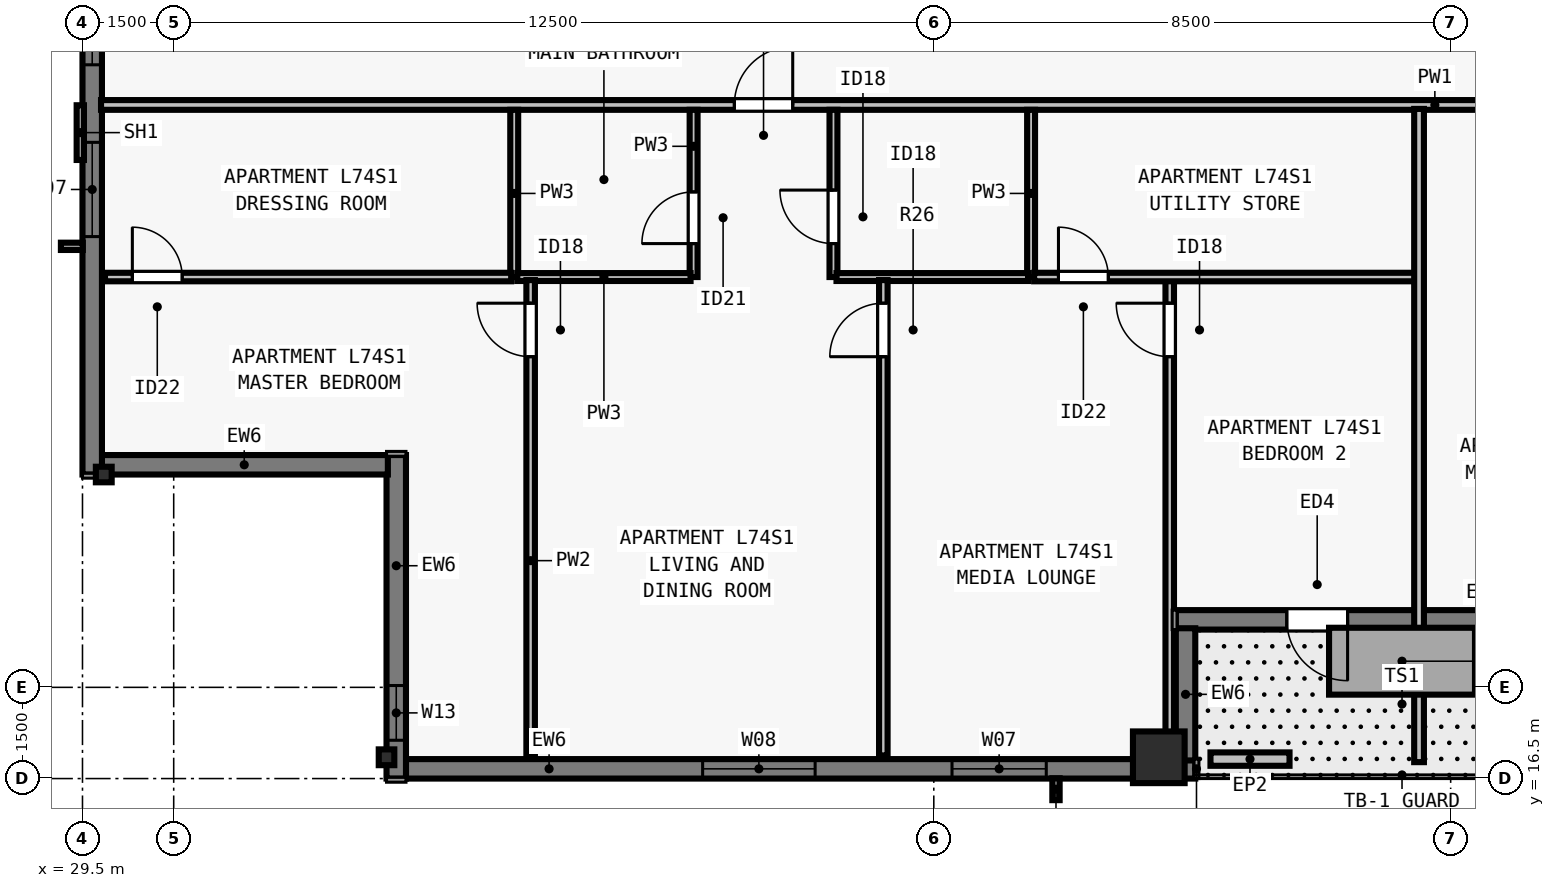
"""IFC4 building model, lengths in metres.
Left out: names, types, materials, properties, quantities, classifications, styles, units other than length and angle.
Written with IfcOpenShell. Run it as: python <this file> out.ifc"""

import sys

from ifc_helpers import new_model, si_unit, direction, frame, frame_2d, origin, origin_2d, place, context, subcontext, project, spatial, rectangle, i_section, extrude, element, fill, save


model = new_model("IFC4")
c1 = context("Model", 3, precision=1e-05, world=origin(), true_north=direction((0.0, 1.0)))
c2 = subcontext(c1, "Body", "Model", "MODEL_VIEW")
j1 = project(units=[si_unit("LENGTHUNIT", "METRE"), si_unit("PLANEANGLEUNIT", "RADIAN")], contexts=[c1])
p1 = place(None, origin())
s1 = spatial("IfcSite", under=j1, at=p1, CompositionType="ELEMENT")
p2 = place(p1, origin())
s2 = spatial("IfcBuilding", under=s1, at=p2, CompositionType="ELEMENT")
p3 = place(p2, frame((0.0, 0.0, 269.0)))
s3 = spatial("IfcBuildingStorey", under=s2, at=p3, CompositionType="ELEMENT", Elevation=269.0)
p4 = place(p3, frame((34.5, 16.85, 0.0), z_axis=(0.0, 0.0, 1.0), x_axis=(1.0, 0.0, 0.0)))
e1 = element("IfcColumn", 1, at=p4, inside=s3, PredefinedType="COLUMN", context=c2, shape_type="SweptSolid", body=[
    extrude(i_section(OverallWidth=0.256, OverallDepth=0.26, WebThickness=0.01, FlangeThickness=0.017, FilletRadius=0.013, at=origin_2d()), origin(), (0.0, 0.0, 1.0), 3.5),
])
p5 = place(p3, frame((47.2, 16.85, 0.0), z_axis=(0.0, 0.0, 1.0), x_axis=(1.0, 0.0, 0.0)))
e2 = element("IfcColumn", 2, at=p5, inside=s3, PredefinedType="COLUMN", context=c2, shape_type="SweptSolid", body=[
    extrude(rectangle(XDim=0.85, YDim=0.85, at=origin_2d()), origin(), (0.0, 0.0, 1.0), 3.5),
])
p6 = place(p3, frame((29.85, 21.5, 0.0), z_axis=(0.0, 0.0, 1.0), x_axis=(0.0, 1.0, 0.0)))
e3 = element("IfcColumn", 3, at=p6, inside=s3, PredefinedType="COLUMN", context=c2, shape_type="SweptSolid", body=[
    extrude(i_section(OverallWidth=0.256, OverallDepth=0.26, WebThickness=0.01, FlangeThickness=0.017, FilletRadius=0.013, at=origin_2d()), origin(), (0.0, 0.0, 1.0), 3.5),
])
p7 = place(p3, frame((47.8, 16.66, 0.0), z_axis=(0.0, 0.0, 1.0), x_axis=(-1.0, 0.0, 0.0)))
e4 = element("IfcWall", 4, at=p7, inside=s3, PredefinedType="SOLIDWALL", context=c2, shape_type="SweptSolid", body=[
    extrude(rectangle(XDim=13.002, YDim=0.32, at=frame_2d((6.501, 0.0))), origin(), (0.0, 0.0, 1.0), 3.29),
])
p8 = place(p7, frame((2.45, 0.0, 0.8)))
e5 = element("IfcOpeningElement", 5, at=p8, cuts=e4, PredefinedType="OPENING", context=c2, shape_type="SweptSolid", body=[
    extrude(rectangle(XDim=1.55, YDim=1.678, at=frame_2d((0.775, 0.839))), frame((0.0, 0.17, 0.0), z_axis=(0.0, -1.0, 0.0), x_axis=(1.0, 0.0, 0.0)), (0.0, 0.0, 1.0), 0.34),
])
p9 = place(p7, frame((6.251, 0.0, 0.8)))
e6 = element("IfcOpeningElement", 6, at=p9, cuts=e4, PredefinedType="OPENING", context=c2, shape_type="SweptSolid", body=[
    extrude(rectangle(XDim=1.85, YDim=1.678, at=frame_2d((0.925, 0.839))), frame((0.0, 0.17, 0.0), z_axis=(0.0, -1.0, 0.0), x_axis=(1.0, 0.0, 0.0)), (0.0, 0.0, 1.0), 0.34),
])
p10 = place(p3, frame((34.66, 16.5, 0.0), z_axis=(0.0, 0.0, 1.0), x_axis=(0.0, 1.0, 0.0)))
e7 = element("IfcWall", 7, at=p10, inside=s3, PredefinedType="SOLIDWALL", context=c2, shape_type="SweptSolid", body=[
    extrude(rectangle(XDim=5.32, YDim=0.32, at=frame_2d((2.66, 0.0))), origin(), (0.0, 0.0, 1.0), 3.29),
])
p11 = place(p10, frame((0.63, 0.0, 0.8)))
e8 = element("IfcOpeningElement", 8, at=p11, cuts=e7, PredefinedType="OPENING", context=c2, shape_type="SweptSolid", body=[
    extrude(rectangle(XDim=0.9, YDim=1.678, at=frame_2d((0.45, 0.839))), frame((0.0, 0.17, 0.0), z_axis=(0.0, -1.0, 0.0), x_axis=(1.0, 0.0, 0.0)), (0.0, 0.0, 1.0), 0.34),
])
p12 = place(p3, frame((34.522, 21.66, 0.0), z_axis=(0.0, 0.0, 1.0), x_axis=(-1.0, 0.0, 0.0)))
e9 = element("IfcWall", 9, at=p12, inside=s3, PredefinedType="SOLIDWALL", context=c2, shape_type="SweptSolid", body=[
    extrude(rectangle(XDim=4.724, YDim=0.32, at=frame_2d((2.362, 0.0))), origin(), (0.0, 0.0, 1.0), 3.29),
])
p13 = place(p3, frame((29.66, 21.5, 0.0), z_axis=(0.0, 0.0, 1.0), x_axis=(0.0, 1.0, 0.0)))
e10 = element("IfcWall", 10, at=p13, inside=s3, PredefinedType="SOLIDWALL", context=c2, shape_type="SweptSolid", body=[
    extrude(rectangle(XDim=34.702, YDim=0.32, at=frame_2d((17.351, 0.0))), origin(), (0.0, 0.0, 1.0), 3.29),
])
p14 = place(p13, frame((3.913, 0.0, 0.8)))
e11 = element("IfcOpeningElement", 11, at=p14, cuts=e10, PredefinedType="OPENING", context=c2, shape_type="SweptSolid", body=[
    extrude(rectangle(XDim=1.55, YDim=1.678, at=frame_2d((0.775, 0.839))), frame((0.0, 0.17, 0.0), z_axis=(0.0, -1.0, 0.0), x_axis=(1.0, 0.0, 0.0)), (0.0, 0.0, 1.0), 0.34),
])
p15 = place(p13, frame((6.738, 0.0, 0.8)))
e12 = element("IfcOpeningElement", 12, at=p15, cuts=e10, PredefinedType="OPENING", context=c2, shape_type="SweptSolid", body=[
    extrude(rectangle(XDim=1.85, YDim=1.678, at=frame_2d((0.925, 0.839))), frame((0.0, 0.17, 0.0), z_axis=(0.0, -1.0, 0.0), x_axis=(1.0, 0.0, 0.0)), (0.0, 0.0, 1.0), 0.34),
])
p16 = place(p13, frame((10.263, 0.0, 0.8)))
e13 = element("IfcOpeningElement", 13, at=p16, cuts=e10, PredefinedType="OPENING", context=c2, shape_type="SweptSolid", body=[
    extrude(rectangle(XDim=1.55, YDim=1.678, at=frame_2d((0.775, 0.839))), frame((0.0, 0.17, 0.0), z_axis=(0.0, -1.0, 0.0), x_axis=(1.0, 0.0, 0.0)), (0.0, 0.0, 1.0), 0.34),
])
p17 = place(p13, frame((14.738, 0.0, 0.8)))
e14 = element("IfcOpeningElement", 14, at=p17, cuts=e10, PredefinedType="OPENING", context=c2, shape_type="SweptSolid", body=[
    extrude(rectangle(XDim=1.85, YDim=1.678, at=frame_2d((0.925, 0.839))), frame((0.0, 0.17, 0.0), z_axis=(0.0, -1.0, 0.0), x_axis=(1.0, 0.0, 0.0)), (0.0, 0.0, 1.0), 0.34),
])
p18 = place(p13, frame((18.264, 0.0, 0.8)))
e15 = element("IfcOpeningElement", 15, at=p18, cuts=e10, PredefinedType="OPENING", context=c2, shape_type="SweptSolid", body=[
    extrude(rectangle(XDim=1.55, YDim=1.678, at=frame_2d((0.775, 0.839))), frame((0.0, 0.17, 0.0), z_axis=(0.0, -1.0, 0.0), x_axis=(1.0, 0.0, 0.0)), (0.0, 0.0, 1.0), 0.34),
])
p19 = place(p13, frame((24.164, 0.0, 0.8)))
e16 = element("IfcOpeningElement", 16, at=p19, cuts=e10, PredefinedType="OPENING", context=c2, shape_type="SweptSolid", body=[
    extrude(rectangle(XDim=1.55, YDim=1.678, at=frame_2d((0.775, 0.839))), frame((0.0, 0.17, 0.0), z_axis=(0.0, -1.0, 0.0), x_axis=(1.0, 0.0, 0.0)), (0.0, 0.0, 1.0), 0.34),
])
p20 = place(p3, frame((54.622, 19.11, 0.0), z_axis=(0.0, 0.0, 1.0), x_axis=(-1.0, 0.0, 0.0)))
e17 = element("IfcWall", 17, at=p20, inside=s3, PredefinedType="SOLIDWALL", context=c2, shape_type="SweptSolid", body=[
    extrude(rectangle(XDim=7.142, YDim=0.32, at=frame_2d((3.571, 0.0))), origin(), (0.0, 0.0, 1.0), 3.29),
])
p21 = place(p20, frame((4.317, 0.0, 0.0)))
e18 = element("IfcOpeningElement", 18, at=p21, cuts=e17, PredefinedType="OPENING", context=c2, shape_type="SweptSolid", body=[
    extrude(rectangle(XDim=1.0, YDim=2.15, at=frame_2d((0.5, 1.075))), frame((0.0, 0.17, 0.0), z_axis=(0.0, -1.0, 0.0), x_axis=(1.0, 0.0, 0.0)), (0.0, 0.0, 1.0), 0.34),
])
p22 = place(p3, frame((47.64, 18.972, 0.0), z_axis=(0.0, 0.0, 1.0), x_axis=(0.0, -1.0, 0.0)))
e19 = element("IfcWall", 19, at=p22, inside=s3, PredefinedType="SOLIDWALL", context=c2, shape_type="SweptSolid", body=[
    extrude(rectangle(XDim=2.174, YDim=0.32, at=frame_2d((1.087, 0.0))), origin(), (0.0, 0.0, 1.0), 3.29),
])
p23 = place(p3, frame((48.05, 16.82, 0.0), z_axis=(0.0, 0.0, 1.0), x_axis=(1.0, 0.0, 0.0)))
e20 = element("IfcWall", 20, at=p23, inside=s3, PredefinedType="PARAPET", context=c2, shape_type="SweptSolid", body=[
    extrude(rectangle(XDim=1.3, YDim=0.22, at=frame_2d((0.65, 0.0))), origin(), (0.0, 0.0, 1.0), 0.55),
])
p24 = place(p3, frame((29.805, 27.577, 0.0), z_axis=(0.0, 0.0, 1.0), x_axis=(1.0, 0.0, 0.0)))
e21 = element("IfcWall", 21, at=p24, inside=s3, PredefinedType="PARTITIONING", context=c2, shape_type="SweptSolid", body=[
    extrude(rectangle(XDim=44.39, YDim=0.16, at=frame_2d((22.195, 0.0))), origin(), (0.0, 0.0, 1.0), 2.958),
])
p25 = place(p24, frame((10.415, 0.0, 0.0)))
e22 = element("IfcOpeningElement", 22, at=p25, cuts=e21, PredefinedType="OPENING", context=c2, shape_type="SweptSolid", body=[
    extrude(rectangle(XDim=0.96, YDim=2.18, at=frame_2d((0.48, 1.09))), frame((0.0, 0.09, 0.0), z_axis=(0.0, -1.0, 0.0), x_axis=(1.0, 0.0, 0.0)), (0.0, 0.0, 1.0), 0.18),
])
p26 = place(p24, frame((32.495, 0.0, 0.0)))
e23 = element("IfcOpeningElement", 23, at=p26, cuts=e21, PredefinedType="OPENING", context=c2, shape_type="SweptSolid", body=[
    extrude(rectangle(XDim=0.96, YDim=2.18, at=frame_2d((0.48, 1.09))), frame((0.0, 0.09, 0.0), z_axis=(0.0, -1.0, 0.0), x_axis=(1.0, 0.0, 0.0)), (0.0, 0.0, 1.0), 0.18),
])
p27 = place(p3, frame((36.6, 24.748, 0.0), z_axis=(0.0, 0.0, 1.0), x_axis=(0.0, 1.0, 0.0)))
e24 = element("IfcWall", 24, at=p27, inside=s3, PredefinedType="PLUMBINGWALL", context=c2, shape_type="SweptSolid", body=[
    extrude(rectangle(XDim=2.75, YDim=0.13, at=frame_2d((1.375, 0.0))), origin(), (0.0, 0.0, 1.0), 3.29),
])
p28 = place(p3, frame((39.55, 24.748, 0.0), z_axis=(0.0, 0.0, 1.0), x_axis=(0.0, 1.0, 0.0)))
e25 = element("IfcWall", 25, at=p28, inside=s3, PredefinedType="PLUMBINGWALL", context=c2, shape_type="SweptSolid", body=[
    extrude(rectangle(XDim=2.75, YDim=0.13, at=frame_2d((1.375, 0.0))), origin(), (0.0, 0.0, 1.0), 3.29),
])
p29 = place(p28, frame((0.55, 0.0, 0.0)))
e26 = element("IfcOpeningElement", 26, at=p29, cuts=e25, PredefinedType="OPENING", context=c2, shape_type="SweptSolid", body=[
    extrude(rectangle(XDim=0.85, YDim=2.08, at=frame_2d((0.425, 1.04))), frame((0.0, 0.075, 0.0), z_axis=(0.0, -1.0, 0.0), x_axis=(1.0, 0.0, 0.0)), (0.0, 0.0, 1.0), 0.15),
])
p30 = place(p3, frame((36.65, 24.748, 0.0), z_axis=(0.0, 0.0, 1.0), x_axis=(1.0, 0.0, 0.0)))
e27 = element("IfcWall", 27, at=p30, inside=s3, PredefinedType="PLUMBINGWALL", context=c2, shape_type="SweptSolid", body=[
    extrude(rectangle(XDim=2.85, YDim=0.13, at=frame_2d((1.425, 0.0))), origin(), (0.0, 0.0, 1.0), 3.29),
])
p31 = place(p3, frame((45.1, 24.748, 0.0), z_axis=(0.0, 0.0, 1.0), x_axis=(0.0, 1.0, 0.0)))
e28 = element("IfcWall", 28, at=p31, inside=s3, PredefinedType="PLUMBINGWALL", context=c2, shape_type="SweptSolid", body=[
    extrude(rectangle(XDim=2.75, YDim=0.13, at=frame_2d((1.375, 0.0))), origin(), (0.0, 0.0, 1.0), 3.29),
])
p32 = place(p3, frame((41.85, 24.748, 0.0), z_axis=(0.0, 0.0, 1.0), x_axis=(0.0, 1.0, 0.0)))
e29 = element("IfcWall", 29, at=p32, inside=s3, PredefinedType="PLUMBINGWALL", context=c2, shape_type="SweptSolid", body=[
    extrude(rectangle(XDim=2.75, YDim=0.13, at=frame_2d((1.375, 0.0))), origin(), (0.0, 0.0, 1.0), 3.29),
])
p33 = place(p32, frame((0.55, 0.0, 0.0)))
e30 = element("IfcOpeningElement", 30, at=p33, cuts=e29, PredefinedType="OPENING", context=c2, shape_type="SweptSolid", body=[
    extrude(rectangle(XDim=0.88, YDim=2.1, at=frame_2d((0.44, 1.05))), frame((0.0, 0.075, 0.0), z_axis=(0.0, -1.0, 0.0), x_axis=(1.0, 0.0, 0.0)), (0.0, 0.0, 1.0), 0.15),
])
p34 = place(p3, frame((41.9, 24.748, 0.0), z_axis=(0.0, 0.0, 1.0), x_axis=(1.0, 0.0, 0.0)))
e31 = element("IfcWall", 31, at=p34, inside=s3, PredefinedType="PLUMBINGWALL", context=c2, shape_type="SweptSolid", body=[
    extrude(rectangle(XDim=3.15, YDim=0.13, at=frame_2d((1.575, 0.0))), origin(), (0.0, 0.0, 1.0), 3.29),
])
p35 = place(p3, frame((36.87, 16.88, 0.0), z_axis=(0.0, 0.0, 1.0), x_axis=(0.0, 1.0, 0.0)))
e32 = element("IfcWall", 32, at=p35, inside=s3, PredefinedType="PARTITIONING", context=c2, shape_type="SweptSolid", body=[
    extrude(rectangle(XDim=7.818, YDim=0.14, at=frame_2d((3.909, 0.0))), origin(), (0.0, 0.0, 1.0), 2.573),
])
p36 = place(p35, frame((6.558, 0.0, 0.0)))
e33 = element("IfcOpeningElement", 33, at=p36, cuts=e32, PredefinedType="OPENING", context=c2, shape_type="SweptSolid", body=[
    extrude(rectangle(XDim=0.88, YDim=2.1, at=frame_2d((0.44, 1.05))), frame((0.0, 0.08, 0.0), z_axis=(0.0, -1.0, 0.0), x_axis=(1.0, 0.0, 0.0)), (0.0, 0.0, 1.0), 0.16),
])
p37 = place(p3, frame((29.87, 24.748, 0.0), z_axis=(0.0, 0.0, 1.0), x_axis=(1.0, 0.0, 0.0)))
e34 = element("IfcWall", 34, at=p37, inside=s3, PredefinedType="PARTITIONING", context=c2, shape_type="SweptSolid", body=[
    extrude(rectangle(XDim=6.68, YDim=0.14, at=frame_2d((3.34, 0.0))), origin(), (0.0, 0.0, 1.0), 2.958),
])
p38 = place(p37, frame((0.45, 0.0, 0.0)))
e35 = element("IfcOpeningElement", 35, at=p38, cuts=e34, PredefinedType="OPENING", context=c2, shape_type="SweptSolid", body=[
    extrude(rectangle(XDim=0.82, YDim=2.1, at=frame_2d((0.41, 1.05))), frame((0.0, 0.08, 0.0), z_axis=(0.0, -1.0, 0.0), x_axis=(1.0, 0.0, 0.0)), (0.0, 0.0, 1.0), 0.16),
])
p39 = place(p3, frame((47.38, 16.88, 0.0), z_axis=(0.0, 0.0, 1.0), x_axis=(0.0, 1.0, 0.0)))
e36 = element("IfcWall", 36, at=p39, inside=s3, PredefinedType="PARTITIONING", context=c2, shape_type="SweptSolid", body=[
    extrude(rectangle(XDim=7.908, YDim=0.14, at=frame_2d((3.954, 0.0))), origin(), (0.0, 0.0, 1.0), 2.573),
])
p40 = place(p39, frame((6.558, 0.0, 0.0)))
e37 = element("IfcOpeningElement", 37, at=p40, cuts=e36, PredefinedType="OPENING", context=c2, shape_type="SweptSolid", body=[
    extrude(rectangle(XDim=0.88, YDim=2.1, at=frame_2d((0.44, 1.05))), frame((0.0, 0.08, 0.0), z_axis=(0.0, -1.0, 0.0), x_axis=(1.0, 0.0, 0.0)), (0.0, 0.0, 1.0), 0.16),
])
p41 = place(p3, frame((45.15, 24.748, 0.0), z_axis=(0.0, 0.0, 1.0), x_axis=(1.0, 0.0, 0.0)))
e38 = element("IfcWall", 38, at=p41, inside=s3, PredefinedType="PARTITIONING", context=c2, shape_type="SweptSolid", body=[
    extrude(rectangle(XDim=6.38, YDim=0.14, at=frame_2d((3.19, 0.0))), origin(), (0.0, 0.0, 1.0), 3.29),
])
p42 = place(p41, frame((0.4, 0.0, 0.0)))
e39 = element("IfcOpeningElement", 39, at=p42, cuts=e38, PredefinedType="OPENING", context=c2, shape_type="SweptSolid", body=[
    extrude(rectangle(XDim=0.82, YDim=2.1, at=frame_2d((0.41, 1.05))), frame((0.0, 0.08, 0.0), z_axis=(0.0, -1.0, 0.0), x_axis=(1.0, 0.0, 0.0)), (0.0, 0.0, 1.0), 0.16),
])
p43 = place(p3, frame((42.67, 16.88, 0.0), z_axis=(0.0, 0.0, 1.0), x_axis=(0.0, 1.0, 0.0)))
e40 = element("IfcWall", 40, at=p43, inside=s3, PredefinedType="PARTITIONING", context=c2, shape_type="SweptSolid", body=[
    extrude(rectangle(XDim=7.818, YDim=0.14, at=frame_2d((3.909, 0.0))), origin(), (0.0, 0.0, 1.0), 3.29),
])
p44 = place(p43, frame((6.558, 0.0, 0.0)))
e41 = element("IfcOpeningElement", 41, at=p44, cuts=e40, PredefinedType="OPENING", context=c2, shape_type="SweptSolid", body=[
    extrude(rectangle(XDim=0.88, YDim=2.1, at=frame_2d((0.44, 1.05))), frame((0.0, 0.08, 0.0), z_axis=(0.0, -1.0, 0.0), x_axis=(1.0, 0.0, 0.0)), (0.0, 0.0, 1.0), 0.16),
])
p45 = place(p3, frame((51.48, 16.77, 0.0), z_axis=(0.0, 0.0, 1.0), x_axis=(0.0, 1.0, 0.0)))
e42 = element("IfcWall", 42, at=p45, inside=s3, PredefinedType="PARTITIONING", context=c2, shape_type="SweptSolid", body=[
    extrude(rectangle(XDim=10.742, YDim=0.16, at=frame_2d((5.371, 0.0))), origin(), (0.0, 0.0, 1.0), 2.958),
])
p46 = place(p8, origin())
e43 = element("IfcWindow", 43, at=p46, inside=s3, PartitioningType="SINGLE_PANEL", PredefinedType="WINDOW", context=c2, shape_type="SweptSolid", body=[
    extrude(rectangle(XDim=1.55, YDim=1.678, at=frame_2d((0.775, 0.839))), frame((0.0, -0.05, 0.0), z_axis=(0.0, -1.0, 0.0), x_axis=(1.0, 0.0, 0.0)), (0.0, 0.0, 1.0), 0.06),
])
fill(e5, e43)
p47 = place(p9, origin())
e44 = element("IfcWindow", 44, at=p47, inside=s3, PartitioningType="SINGLE_PANEL", PredefinedType="WINDOW", context=c2, shape_type="SweptSolid", body=[
    extrude(rectangle(XDim=1.85, YDim=1.678, at=frame_2d((0.925, 0.839))), frame((0.0, -0.05, 0.0), z_axis=(0.0, -1.0, 0.0), x_axis=(1.0, 0.0, 0.0)), (0.0, 0.0, 1.0), 0.06),
])
fill(e6, e44)
p48 = place(p14, origin())
e45 = element("IfcWindow", 45, at=p48, inside=s3, PartitioningType="SINGLE_PANEL", PredefinedType="WINDOW", context=c2, shape_type="SweptSolid", body=[
    extrude(rectangle(XDim=1.55, YDim=1.678, at=frame_2d((0.775, 0.839))), frame((0.0, -0.05, 0.0), z_axis=(0.0, -1.0, 0.0), x_axis=(1.0, 0.0, 0.0)), (0.0, 0.0, 1.0), 0.06),
])
fill(e11, e45)
p49 = place(p15, origin())
e46 = element("IfcWindow", 46, at=p49, inside=s3, PartitioningType="SINGLE_PANEL", PredefinedType="WINDOW", context=c2, shape_type="SweptSolid", body=[
    extrude(rectangle(XDim=1.85, YDim=1.678, at=frame_2d((0.925, 0.839))), frame((0.0, -0.05, 0.0), z_axis=(0.0, -1.0, 0.0), x_axis=(1.0, 0.0, 0.0)), (0.0, 0.0, 1.0), 0.06),
])
fill(e12, e46)
p50 = place(p21, origin())
e47 = element("IfcDoor", 47, at=p50, inside=s3, OperationType="SINGLE_SWING_LEFT", PredefinedType="DOOR", context=c2, shape_type="SweptSolid", body=[
    extrude(rectangle(XDim=1.0, YDim=2.15, at=frame_2d((0.5, 1.075))), frame((0.0, 0.025, 0.0), z_axis=(0.0, -1.0, 0.0), x_axis=(1.0, 0.0, 0.0)), (0.0, 0.0, 1.0), 0.05),
])
fill(e18, e47)
p51 = place(p11, origin())
e48 = element("IfcWindow", 48, at=p51, inside=s3, PartitioningType="SINGLE_PANEL", PredefinedType="WINDOW", context=c2, shape_type="SweptSolid", body=[
    extrude(rectangle(XDim=0.9, YDim=1.678, at=frame_2d((0.45, 0.839))), frame((0.0, -0.04, 0.0), z_axis=(0.0, -1.0, 0.0), x_axis=(1.0, 0.0, 0.0)), (0.0, 0.0, 1.0), 0.06),
])
fill(e8, e48)
p52 = place(p29, origin())
e49 = element("IfcDoor", 49, at=p52, inside=s3, OperationType="SINGLE_SWING_LEFT", PredefinedType="DOOR", context=c2, shape_type="SweptSolid", body=[
    extrude(rectangle(XDim=0.85, YDim=2.08, at=frame_2d((0.425, 1.04))), frame((0.0, 0.025, 0.0), z_axis=(0.0, -1.0, 0.0), x_axis=(1.0, 0.0, 0.0)), (0.0, 0.0, 1.0), 0.05),
])
fill(e26, e49)
p53 = place(p33, origin())
e50 = element("IfcDoor", 50, at=p53, inside=s3, OperationType="SINGLE_SWING_RIGHT", PredefinedType="DOOR", context=c2, shape_type="SweptSolid", body=[
    extrude(rectangle(XDim=0.88, YDim=2.1, at=frame_2d((0.44, 1.05))), frame((0.0, 0.025, 0.0), z_axis=(0.0, -1.0, 0.0), x_axis=(1.0, 0.0, 0.0)), (0.0, 0.0, 1.0), 0.05),
])
fill(e30, e50)
p54 = place(p38, origin())
e51 = element("IfcDoor", 51, at=p54, inside=s3, OperationType="SINGLE_SWING_LEFT", PredefinedType="DOOR", context=c2, shape_type="SweptSolid", body=[
    extrude(rectangle(XDim=0.82, YDim=2.1, at=frame_2d((0.41, 1.05))), frame((0.0, 0.025, 0.0), z_axis=(0.0, -1.0, 0.0), x_axis=(1.0, 0.0, 0.0)), (0.0, 0.0, 1.0), 0.05),
])
fill(e35, e51)
p55 = place(p36, origin())
e52 = element("IfcDoor", 52, at=p55, inside=s3, OperationType="SINGLE_SWING_RIGHT", PredefinedType="DOOR", context=c2, shape_type="SweptSolid", body=[
    extrude(rectangle(XDim=0.88, YDim=2.1, at=frame_2d((0.44, 1.05))), frame((0.0, 0.025, 0.0), z_axis=(0.0, -1.0, 0.0), x_axis=(1.0, 0.0, 0.0)), (0.0, 0.0, 1.0), 0.05),
])
fill(e33, e52)
p56 = place(p42, origin())
e53 = element("IfcDoor", 53, at=p56, inside=s3, OperationType="SINGLE_SWING_LEFT", PredefinedType="DOOR", context=c2, shape_type="SweptSolid", body=[
    extrude(rectangle(XDim=0.82, YDim=2.1, at=frame_2d((0.41, 1.05))), frame((0.0, 0.025, 0.0), z_axis=(0.0, -1.0, 0.0), x_axis=(1.0, 0.0, 0.0)), (0.0, 0.0, 1.0), 0.05),
])
fill(e39, e53)
p57 = place(p40, origin())
e54 = element("IfcDoor", 54, at=p57, inside=s3, OperationType="SINGLE_SWING_RIGHT", PredefinedType="DOOR", context=c2, shape_type="SweptSolid", body=[
    extrude(rectangle(XDim=0.88, YDim=2.1, at=frame_2d((0.44, 1.05))), frame((0.0, 0.025, 0.0), z_axis=(0.0, -1.0, 0.0), x_axis=(1.0, 0.0, 0.0)), (0.0, 0.0, 1.0), 0.05),
])
fill(e37, e54)
p58 = place(p44, origin())
e55 = element("IfcDoor", 55, at=p58, inside=s3, OperationType="SINGLE_SWING_LEFT", PredefinedType="DOOR", context=c2, shape_type="SweptSolid", body=[
    extrude(rectangle(XDim=0.88, YDim=2.1, at=frame_2d((0.44, 1.05))), frame((0.0, 0.025, 0.0), z_axis=(0.0, -1.0, 0.0), x_axis=(1.0, 0.0, 0.0)), (0.0, 0.0, 1.0), 0.05),
])
fill(e41, e55)
p59 = place(p25, origin())
e56 = element("IfcDoor", 56, at=p59, inside=s3, OperationType="SINGLE_SWING_RIGHT", PredefinedType="DOOR", context=c2, shape_type="SweptSolid", body=[
    extrude(rectangle(XDim=0.96, YDim=2.18, at=frame_2d((0.48, 1.09))), frame((0.0, 0.025, 0.0), z_axis=(0.0, -1.0, 0.0), x_axis=(1.0, 0.0, 0.0)), (0.0, 0.0, 1.0), 0.05),
])
fill(e22, e56)
save(model, sys.argv[1])
